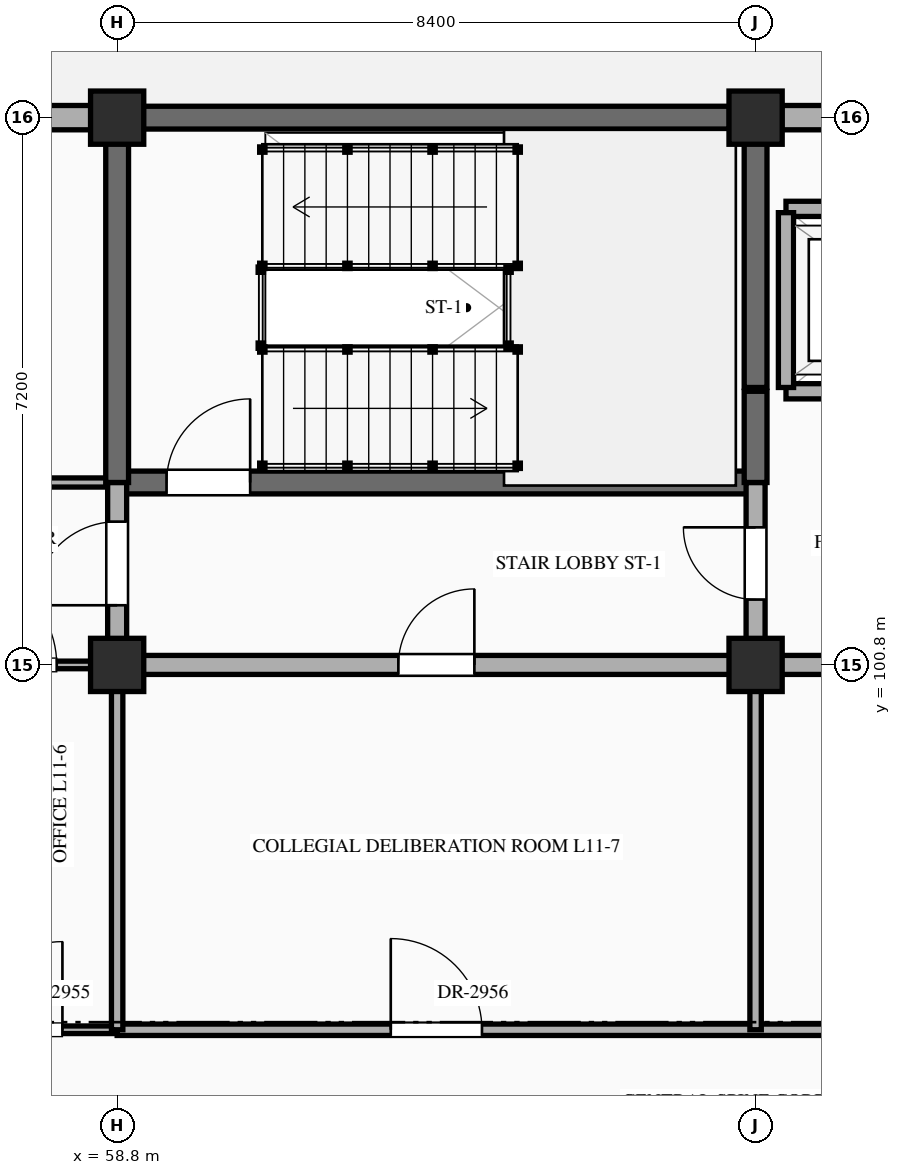
"""IFC4 building model, lengths in metres.
Left out: names, types, materials, properties, quantities, classifications, styles, units other than length and angle.
Written with IfcOpenShell. Run it as: python <this file> out.ifc"""

import sys

from ifc_helpers import new_model, si_unit, direction, frame, frame_2d, origin, origin_2d, place, context, subcontext, project, spatial, rectangle, extrude, element, fill, save


model = new_model("IFC4")
c1 = context("Model", 3, precision=1e-05, world=origin(), true_north=direction((0.0, 1.0)))
c2 = subcontext(c1, "Body", "Model", "MODEL_VIEW")
j1 = project(units=[si_unit("LENGTHUNIT", "METRE"), si_unit("PLANEANGLEUNIT", "RADIAN")], contexts=[c1])
p1 = place(None, origin())
s1 = spatial("IfcSite", under=j1, at=p1, CompositionType="ELEMENT")
p2 = place(p1, origin())
s2 = spatial("IfcBuilding", under=s1, at=p2, CompositionType="ELEMENT")
p3 = place(p2, frame((0.0, 0.0, 47.7)))
s3 = spatial("IfcBuildingStorey", under=s2, at=p3, CompositionType="ELEMENT", Elevation=47.7)
for number, where, z_axis, x_axis in (
    (1, (58.8, 100.8, 0.0), (0.0, 0.0, 1.0), (1.0, 0.0, 0.0)),
    (2, (58.8, 108.0, 0.0), (0.0, 0.0, 1.0), (1.0, 0.0, 0.0)),
    (3, (67.2, 100.8, 0.0), (0.0, 0.0, 1.0), (1.0, 0.0, 0.0)),
    (4, (67.2, 108.0, 0.0), (0.0, 0.0, 1.0), (1.0, 0.0, 0.0)),
):
    element("IfcColumn", number, at=place(p3, frame(where, z_axis=z_axis, x_axis=x_axis)), inside=s3, PredefinedType="COLUMN", context=c2, shape_type="SweptSolid", body=[
        extrude(rectangle(XDim=0.7, YDim=0.7, at=origin_2d()), origin(), (0.0, 0.0, 1.0), 4.2),
    ])
p4 = place(p3, frame((50.745, 108.0, 0.0), z_axis=(0.0, 0.0, 1.0), x_axis=(1.0, 0.0, 0.0)))
e5 = element("IfcWall", 5, at=p4, inside=s3, PredefinedType="STANDARD", context=c2, shape_type="SweptSolid", body=[
    extrude(rectangle(XDim=7.71, YDim=0.32, at=frame_2d((3.855, 0.0))), origin(), (0.0, 0.0, 1.0), 3.31),
])
p5 = place(p4, frame((5.405, 0.0, 0.55)))
e6 = element("IfcOpeningElement", 6, at=p5, cuts=e5, PredefinedType="OPENING", context=c2, shape_type="SweptSolid", body=[
    extrude(rectangle(XDim=0.9, YDim=1.38, at=frame_2d((0.45, 0.69))), frame((0.0, 0.172, 0.0), z_axis=(0.0, -1.0, 0.0), x_axis=(1.0, 0.0, 0.0)), (0.0, 0.0, 1.0), 0.344),
])
p6 = place(p3, frame((59.145, 108.0, 0.0), z_axis=(0.0, 0.0, 1.0), x_axis=(1.0, 0.0, 0.0)))
e7 = element("IfcWall", 7, at=p6, inside=s3, PredefinedType="SHEAR", context=c2, shape_type="SweptSolid", body=[
    extrude(rectangle(XDim=7.71, YDim=0.3, at=frame_2d((3.855, 0.0))), origin(), (0.0, 0.0, 1.0), 3.96),
])
p7 = place(p3, frame((67.545, 108.0, 0.0), z_axis=(0.0, 0.0, 1.0), x_axis=(1.0, 0.0, 0.0)))
e8 = element("IfcWall", 8, at=p7, inside=s3, PredefinedType="STANDARD", context=c2, shape_type="SweptSolid", body=[
    extrude(rectangle(XDim=7.71, YDim=0.32, at=frame_2d((3.855, 0.0))), origin(), (0.0, 0.0, 1.0), 3.31),
])
p8 = place(p3, frame((50.44, 96.0, 0.0), z_axis=(0.0, 0.0, 1.0), x_axis=(1.0, 0.0, 0.0)))
e9 = element("IfcWall", 9, at=p8, inside=s3, PredefinedType="STANDARD", context=c2, shape_type="SweptSolid", body=[
    extrude(rectangle(XDim=8.36, YDim=0.1, at=frame_2d((4.18, 0.0))), origin(), (0.0, 0.0, 1.0), 3.96),
])
p9 = place(p8, frame((1.14, 0.0, 0.0)))
e10 = element("IfcOpeningElement", 10, at=p9, cuts=e9, PredefinedType="OPENING", context=c2, shape_type="SweptSolid", body=[
    extrude(rectangle(XDim=1.08, YDim=2.25, at=frame_2d((0.54, 1.125))), frame((0.0, 0.062, 0.0), z_axis=(0.0, -1.0, 0.0), x_axis=(1.0, 0.0, 0.0)), (0.0, 0.0, 1.0), 0.124),
])
p10 = place(p8, frame((4.0, 0.0, 0.0)))
e11 = element("IfcOpeningElement", 11, at=p10, cuts=e9, PredefinedType="OPENING", context=c2, shape_type="SweptSolid", body=[
    extrude(rectangle(XDim=1.12, YDim=2.25, at=frame_2d((0.56, 1.125))), frame((0.0, 0.062, 0.0), z_axis=(0.0, -1.0, 0.0), x_axis=(1.0, 0.0, 0.0)), (0.0, 0.0, 1.0), 0.124),
])
p11 = place(p8, frame((6.48, 0.0, 0.0)))
e12 = element("IfcOpeningElement", 12, at=p11, cuts=e9, PredefinedType="OPENING", context=c2, shape_type="SweptSolid", body=[
    extrude(rectangle(XDim=1.16, YDim=2.3, at=frame_2d((0.58, 1.15))), frame((0.0, 0.062, 0.0), z_axis=(0.0, -1.0, 0.0), x_axis=(1.0, 0.0, 0.0)), (0.0, 0.0, 1.0), 0.124),
])
p12 = place(p3, frame((58.8, 96.0, 0.0), z_axis=(0.0, 0.0, 1.0), x_axis=(1.0, 0.0, 0.0)))
e13 = element("IfcWall", 13, at=p12, inside=s3, PredefinedType="STANDARD", context=c2, shape_type="SweptSolid", body=[
    extrude(rectangle(XDim=25.2, YDim=0.15, at=frame_2d((12.6, 0.0))), origin(), (0.0, 0.0, 1.0), 3.96),
])
p13 = place(p12, frame((3.6, 0.0, 0.0)))
e14 = element("IfcOpeningElement", 14, at=p13, cuts=e13, PredefinedType="OPENING", context=c2, shape_type="SweptSolid", body=[
    extrude(rectangle(XDim=1.2, YDim=2.35, at=frame_2d((0.6, 1.175))), frame((0.0, 0.087, 0.0), z_axis=(0.0, -1.0, 0.0), x_axis=(1.0, 0.0, 0.0)), (0.0, 0.0, 1.0), 0.174),
])
p14 = place(p12, frame((11.98, 0.0, 0.0)))
e15 = element("IfcOpeningElement", 15, at=p14, cuts=e13, PredefinedType="OPENING", context=c2, shape_type="SweptSolid", body=[
    extrude(rectangle(XDim=1.24, YDim=2.3, at=frame_2d((0.62, 1.15))), frame((0.0, 0.087, 0.0), z_axis=(0.0, -1.0, 0.0), x_axis=(1.0, 0.0, 0.0)), (0.0, 0.0, 1.0), 0.174),
])
p15 = place(p12, frame((20.36, 0.0, 0.0)))
e16 = element("IfcOpeningElement", 16, at=p15, cuts=e13, PredefinedType="OPENING", context=c2, shape_type="SweptSolid", body=[
    extrude(rectangle(XDim=1.28, YDim=2.35, at=frame_2d((0.64, 1.175))), frame((0.0, 0.087, 0.0), z_axis=(0.0, -1.0, 0.0), x_axis=(1.0, 0.0, 0.0)), (0.0, 0.0, 1.0), 0.174),
])
p16 = place(p3, frame((50.44, 100.8, 0.0), z_axis=(0.0, 0.0, 1.0), x_axis=(1.0, 0.0, 0.0)))
e17 = element("IfcWall", 17, at=p16, inside=s3, PredefinedType="STANDARD", context=c2, shape_type="SweptSolid", body=[
    extrude(rectangle(XDim=8.36, YDim=0.1, at=frame_2d((4.18, 0.0))), origin(), (0.0, 0.0, 1.0), 3.11),
])
p17 = place(p16, frame((1.195, 0.0, 0.0)))
e18 = element("IfcOpeningElement", 18, at=p17, cuts=e17, PredefinedType="OPENING", context=c2, shape_type="SweptSolid", body=[
    extrude(rectangle(XDim=1.2, YDim=2.35, at=frame_2d((0.6, 1.175))), frame((0.0, 0.062, 0.0), z_axis=(0.0, -1.0, 0.0), x_axis=(1.0, 0.0, 0.0)), (0.0, 0.0, 1.0), 0.124),
])
p18 = place(p16, frame((3.94, 0.0, 0.0)))
e19 = element("IfcOpeningElement", 19, at=p18, cuts=e17, PredefinedType="OPENING", context=c2, shape_type="SweptSolid", body=[
    extrude(rectangle(XDim=1.24, YDim=2.3, at=frame_2d((0.62, 1.15))), frame((0.0, 0.062, 0.0), z_axis=(0.0, -1.0, 0.0), x_axis=(1.0, 0.0, 0.0)), (0.0, 0.0, 1.0), 0.124),
])
p19 = place(p16, frame((6.285, 0.0, 0.0)))
e20 = element("IfcOpeningElement", 20, at=p19, cuts=e17, PredefinedType="OPENING", context=c2, shape_type="SweptSolid", body=[
    extrude(rectangle(XDim=1.28, YDim=2.35, at=frame_2d((0.64, 1.175))), frame((0.0, 0.062, 0.0), z_axis=(0.0, -1.0, 0.0), x_axis=(1.0, 0.0, 0.0)), (0.0, 0.0, 1.0), 0.124),
])
p20 = place(p3, frame((58.8, 100.8, 0.0), z_axis=(0.0, 0.0, 1.0), x_axis=(1.0, 0.0, 0.0)))
e21 = element("IfcWall", 21, at=p20, inside=s3, PredefinedType="STANDARD", context=c2, shape_type="SweptSolid", body=[
    extrude(rectangle(XDim=12.6, YDim=0.25, at=frame_2d((6.3, 0.0))), origin(), (0.0, 0.0, 1.0), 3.11),
])
p21 = place(p20, frame((3.7, 0.0, 0.0)))
e22 = element("IfcOpeningElement", 22, at=p21, cuts=e21, PredefinedType="OPENING", context=c2, shape_type="SweptSolid", body=[
    extrude(rectangle(XDim=1.0, YDim=2.2, at=frame_2d((0.5, 1.1))), frame((0.0, 0.137, 0.0), z_axis=(0.0, -1.0, 0.0), x_axis=(1.0, 0.0, 0.0)), (0.0, 0.0, 1.0), 0.274),
])
p22 = place(p3, frame((50.44, 103.2, 0.0), z_axis=(0.0, 0.0, 1.0), x_axis=(1.0, 0.0, 0.0)))
e23 = element("IfcWall", 23, at=p22, inside=s3, PredefinedType="STANDARD", context=c2, shape_type="SweptSolid", body=[
    extrude(rectangle(XDim=8.36, YDim=0.12, at=frame_2d((4.18, 0.0))), origin(), (0.0, 0.0, 1.0), 3.96),
])
p23 = place(p22, frame((3.6, 0.0, 0.0)))
e24 = element("IfcOpeningElement", 24, at=p23, cuts=e23, PredefinedType="OPENING", context=c2, shape_type="SweptSolid", body=[
    extrude(rectangle(XDim=1.16, YDim=2.3, at=frame_2d((0.58, 1.15))), frame((0.0, 0.072, 0.0), z_axis=(0.0, -1.0, 0.0), x_axis=(1.0, 0.0, 0.0)), (0.0, 0.0, 1.0), 0.144),
])
p24 = place(p3, frame((58.8, 103.2, 0.0), z_axis=(0.0, 0.0, 1.0), x_axis=(1.0, 0.0, 0.0)))
e25 = element("IfcWall", 25, at=p24, inside=s3, PredefinedType="SHEAR", context=c2, shape_type="SweptSolid", body=[
    extrude(rectangle(XDim=8.4, YDim=0.3, at=frame_2d((4.2, 0.0))), origin(), (0.0, 0.0, 1.0), 3.96),
])
p25 = place(p24, frame((0.65, 0.0, 0.0)))
e26 = element("IfcOpeningElement", 26, at=p25, cuts=e25, PredefinedType="OPENING", context=c2, shape_type="SweptSolid", body=[
    extrude(rectangle(XDim=1.1, YDim=2.2, at=frame_2d((0.55, 1.1))), frame((0.0, 0.162, 0.0), z_axis=(0.0, -1.0, 0.0), x_axis=(1.0, 0.0, 0.0)), (0.0, 0.0, 1.0), 0.324),
])
p26 = place(p3, frame((67.6, 104.4, 0.0), z_axis=(0.0, 0.0, 1.0), x_axis=(1.0, 0.0, 0.0)))
e27 = element("IfcWall", 27, at=p26, inside=s3, PredefinedType="STANDARD", context=c2, shape_type="SweptSolid", body=[
    extrude(rectangle(XDim=3.0, YDim=0.2, at=frame_2d((1.5, 0.0))), origin(), (0.0, 0.0, 1.0), 3.96),
])
p27 = place(p26, frame((0.9, 0.0, 0.0)))
e28 = element("IfcOpeningElement", 28, at=p27, cuts=e27, PredefinedType="OPENING", context=c2, shape_type="SweptSolid", body=[
    extrude(rectangle(XDim=1.2, YDim=2.15, at=frame_2d((0.6, 1.075))), frame((0.0, 0.112, 0.0), z_axis=(0.0, -1.0, 0.0), x_axis=(1.0, 0.0, 0.0)), (0.0, 0.0, 1.0), 0.224),
])
p28 = place(p3, frame((67.6, 106.8, 0.0), z_axis=(0.0, 0.0, 1.0), x_axis=(1.0, 0.0, 0.0)))
e29 = element("IfcWall", 29, at=p28, inside=s3, PredefinedType="STANDARD", context=c2, shape_type="SweptSolid", body=[
    extrude(rectangle(XDim=3.0, YDim=0.2, at=frame_2d((1.5, 0.0))), origin(), (0.0, 0.0, 1.0), 3.96),
])
p29 = place(p3, frame((58.8, 96.0, 0.0), z_axis=(0.0, 0.0, 1.0), x_axis=(0.0, 1.0, 0.0)))
e30 = element("IfcWall", 30, at=p29, inside=s3, PredefinedType="STANDARD", context=c2, shape_type="SweptSolid", body=[
    extrude(rectangle(XDim=4.8, YDim=0.15, at=frame_2d((2.4, 0.0))), origin(), (0.0, 0.0, 1.0), 3.21),
])
p30 = place(p3, frame((58.8, 100.8, 0.0), z_axis=(0.0, 0.0, 1.0), x_axis=(0.0, 1.0, 0.0)))
e31 = element("IfcWall", 31, at=p30, inside=s3, PredefinedType="STANDARD", context=c2, shape_type="SweptSolid", body=[
    extrude(rectangle(XDim=2.4, YDim=0.25, at=frame_2d((1.2, 0.0))), origin(), (0.0, 0.0, 1.0), 3.21),
])
p31 = place(p30, frame((0.785, 0.0, 0.0)))
e32 = element("IfcOpeningElement", 32, at=p31, cuts=e31, PredefinedType="OPENING", context=c2, shape_type="SweptSolid", body=[
    extrude(rectangle(XDim=1.1, YDim=2.2, at=frame_2d((0.55, 1.1))), frame((0.0, 0.137, 0.0), z_axis=(0.0, -1.0, 0.0), x_axis=(1.0, 0.0, 0.0)), (0.0, 0.0, 1.0), 0.274),
])
p32 = place(p3, frame((58.8, 103.2, 0.0), z_axis=(0.0, 0.0, 1.0), x_axis=(0.0, 1.0, 0.0)))
e33 = element("IfcWall", 33, at=p32, inside=s3, PredefinedType="SHEAR", context=c2, shape_type="SweptSolid", body=[
    extrude(rectangle(XDim=4.76, YDim=0.3, at=frame_2d((2.38, 0.0))), origin(), (0.0, 0.0, 1.0), 3.96),
])
p33 = place(p3, frame((67.2, 96.0, 0.0), z_axis=(0.0, 0.0, 1.0), x_axis=(0.0, 1.0, 0.0)))
e34 = element("IfcWall", 34, at=p33, inside=s3, PredefinedType="STANDARD", context=c2, shape_type="SweptSolid", body=[
    extrude(rectangle(XDim=4.8, YDim=0.15, at=frame_2d((2.4, 0.0))), origin(), (0.0, 0.0, 1.0), 3.21),
])
p34 = place(p3, frame((67.2, 100.8, 0.0), z_axis=(0.0, 0.0, 1.0), x_axis=(0.0, 1.0, 0.0)))
e35 = element("IfcWall", 35, at=p34, inside=s3, PredefinedType="STANDARD", context=c2, shape_type="SweptSolid", body=[
    extrude(rectangle(XDim=2.4, YDim=0.25, at=frame_2d((1.2, 0.0))), origin(), (0.0, 0.0, 1.0), 3.21),
])
p35 = place(p34, frame((0.86, 0.0, 0.0)))
e36 = element("IfcOpeningElement", 36, at=p35, cuts=e35, PredefinedType="OPENING", context=c2, shape_type="SweptSolid", body=[
    extrude(rectangle(XDim=0.95, YDim=2.15, at=frame_2d((0.475, 1.075))), frame((0.0, 0.137, 0.0), z_axis=(0.0, -1.0, 0.0), x_axis=(1.0, 0.0, 0.0)), (0.0, 0.0, 1.0), 0.274),
])
p36 = place(p3, frame((67.2, 103.2, 0.0), z_axis=(0.0, 0.0, 1.0), x_axis=(0.0, 1.0, 0.0)))
e37 = element("IfcWall", 37, at=p36, inside=s3, PredefinedType="SHEAR", context=c2, shape_type="SweptSolid", body=[
    extrude(rectangle(XDim=1.2, YDim=0.3, at=frame_2d((0.6, 0.0))), origin(), (0.0, 0.0, 1.0), 3.96),
])
p37 = place(p3, frame((67.2, 104.45, 0.0), z_axis=(0.0, 0.0, 1.0), x_axis=(0.0, 1.0, 0.0)))
e38 = element("IfcWall", 38, at=p37, inside=s3, PredefinedType="SHEAR", context=c2, shape_type="SweptSolid", body=[
    extrude(rectangle(XDim=3.46, YDim=0.3, at=frame_2d((1.73, 0.0))), origin(), (0.0, 0.0, 1.0), 3.96),
])
p38 = place(p3, frame((67.6, 104.45, 0.0), z_axis=(0.0, 0.0, 1.0), x_axis=(0.0, 1.0, 0.0)))
e39 = element("IfcWall", 39, at=p38, inside=s3, PredefinedType="STANDARD", context=c2, shape_type="SweptSolid", body=[
    extrude(rectangle(XDim=2.3, YDim=0.2, at=frame_2d((1.15, 0.0))), origin(), (0.0, 0.0, 1.0), 3.96),
])
p39 = place(p25, origin())
e40 = element("IfcDoor", 40, at=p39, inside=s3, OperationType="SINGLE_SWING_RIGHT", PredefinedType="DOOR", context=c2, shape_type="SweptSolid", body=[
    extrude(rectangle(XDim=1.1, YDim=2.2, at=frame_2d((0.55, 1.1))), frame((0.0, 0.025, 0.0), z_axis=(0.0, -1.0, 0.0), x_axis=(1.0, 0.0, 0.0)), (0.0, 0.0, 1.0), 0.05),
])
fill(e26, e40)
p40 = place(p35, origin())
e41 = element("IfcDoor", 41, at=p40, inside=s3, OperationType="SINGLE_SWING_RIGHT", PredefinedType="DOOR", context=c2, shape_type="SweptSolid", body=[
    extrude(rectangle(XDim=0.95, YDim=2.15, at=frame_2d((0.475, 1.075))), frame((0.0, 0.025, 0.0), z_axis=(0.0, -1.0, 0.0), x_axis=(1.0, 0.0, 0.0)), (0.0, 0.0, 1.0), 0.05),
])
fill(e36, e41)
p41 = place(p31, origin())
e42 = element("IfcDoor", 42, at=p41, inside=s3, OperationType="SINGLE_SWING_LEFT", PredefinedType="DOOR", context=c2, shape_type="SweptSolid", body=[
    extrude(rectangle(XDim=1.1, YDim=2.2, at=frame_2d((0.55, 1.1))), frame((0.0, 0.025, 0.0), z_axis=(0.0, -1.0, 0.0), x_axis=(1.0, 0.0, 0.0)), (0.0, 0.0, 1.0), 0.05),
])
fill(e32, e42)
p42 = place(p21, origin())
e43 = element("IfcDoor", 43, at=p42, inside=s3, OperationType="SINGLE_SWING_RIGHT", PredefinedType="DOOR", context=c2, shape_type="SweptSolid", body=[
    extrude(rectangle(XDim=1.0, YDim=2.2, at=frame_2d((0.5, 1.1))), frame((0.0, 0.025, 0.0), z_axis=(0.0, -1.0, 0.0), x_axis=(1.0, 0.0, 0.0)), (0.0, 0.0, 1.0), 0.05),
])
fill(e22, e43)
p43 = place(p19, origin())
e44 = element("IfcDoor", 44, at=p43, inside=s3, OperationType="SINGLE_SWING_LEFT", PredefinedType="DOOR", context=c2, shape_type="SweptSolid", body=[
    extrude(rectangle(XDim=1.28, YDim=2.35, at=frame_2d((0.64, 1.175))), frame((0.0, 0.025, 0.0), z_axis=(0.0, -1.0, 0.0), x_axis=(1.0, 0.0, 0.0)), (0.0, 0.0, 1.0), 0.05),
])
fill(e20, e44)
p44 = place(p11, origin())
e45 = element("IfcDoor", 45, at=p44, inside=s3, OperationType="SINGLE_SWING_RIGHT", PredefinedType="DOOR", context=c2, shape_type="SweptSolid", body=[
    extrude(rectangle(XDim=1.16, YDim=2.3, at=frame_2d((0.58, 1.15))), frame((0.0, 0.025, 0.0), z_axis=(0.0, -1.0, 0.0), x_axis=(1.0, 0.0, 0.0)), (0.0, 0.0, 1.0), 0.05),
])
fill(e12, e45)
p45 = place(p13, origin())
e46 = element("IfcDoor", 46, at=p45, inside=s3, OperationType="SINGLE_SWING_LEFT", PredefinedType="DOOR", context=c2, shape_type="SweptSolid", body=[
    extrude(rectangle(XDim=1.2, YDim=2.35, at=frame_2d((0.6, 1.175))), frame((0.0, 0.025, 0.0), z_axis=(0.0, -1.0, 0.0), x_axis=(1.0, 0.0, 0.0)), (0.0, 0.0, 1.0), 0.05),
])
fill(e14, e46)
save(model, sys.argv[1])
